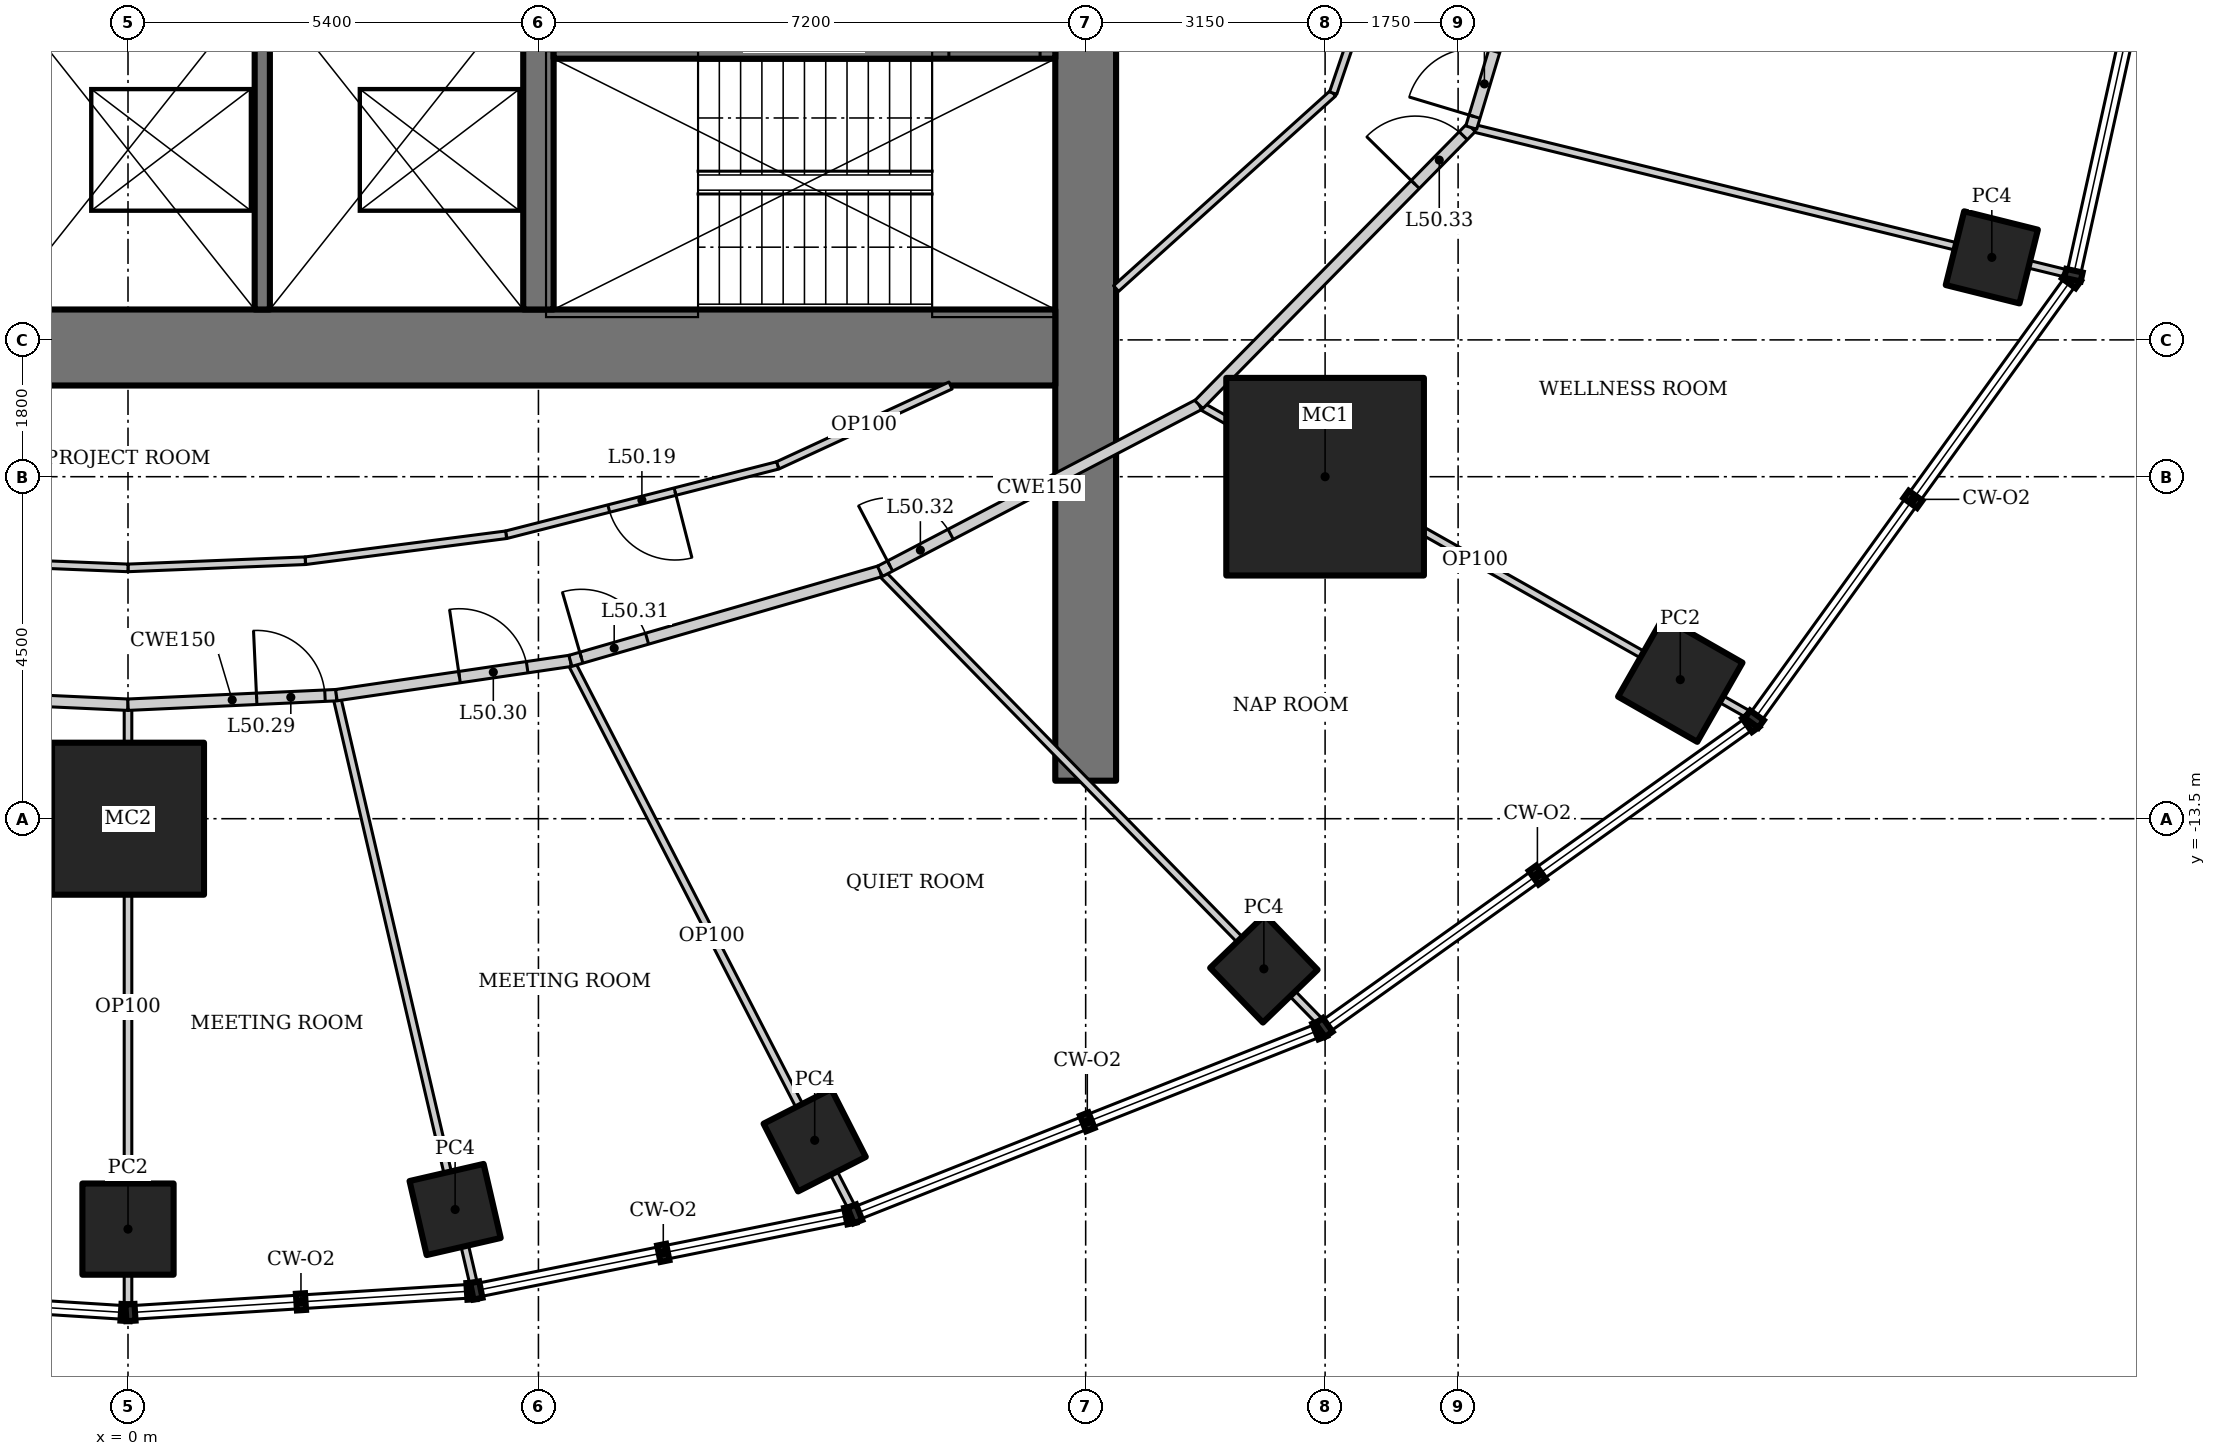
"""IFC4 building model, lengths in metres.
Left out: names, types, materials, properties, quantities, classifications, styles, units other than length and angle.
Written with IfcOpenShell. Run it as: python <this file> out.ifc"""

import sys

from ifc_helpers import new_model, si_unit, direction, frame, frame_2d, origin, origin_2d, place, context, subcontext, project, spatial, rectangle, hollow_rectangle, extrude, element, fill, save


model = new_model("IFC4")
c1 = context("Model", 3, precision=1e-05, world=origin(), true_north=direction((0.0, 1.0)))
c2 = subcontext(c1, "Body", "Model", "MODEL_VIEW")
j1 = project(units=[si_unit("LENGTHUNIT", "METRE"), si_unit("PLANEANGLEUNIT", "RADIAN")], contexts=[c1])
p1 = place(None, origin())
s1 = spatial("IfcSite", under=j1, at=p1, CompositionType="ELEMENT")
p2 = place(p1, origin())
s2 = spatial("IfcBuilding", under=s1, at=p2, CompositionType="ELEMENT")
p3 = place(p2, frame((0.0, 0.0, 215.8)))
s3 = spatial("IfcBuildingStorey", under=s2, at=p3, CompositionType="ELEMENT", Elevation=215.8)
p4 = place(p3, frame((0.0, -13.5, 0.0), z_axis=(0.0, 0.0, 1.0), x_axis=(1.0, 0.0, 0.0)))
e1 = element("IfcColumn", 1, at=p4, inside=s3, PredefinedType="COLUMN", context=c2, shape_type="SweptSolid", body=[
    extrude(hollow_rectangle(XDim=2.0, YDim=2.0, WallThickness=0.17, at=origin_2d()), origin(), (0.0, 0.0, 1.0), 4.2),
])
p5 = place(p3, frame((15.75, -9.0, 0.0), z_axis=(0.0, 0.0, 1.0), x_axis=(1.0, 0.0, 0.0)))
e2 = element("IfcColumn", 2, at=p5, inside=s3, PredefinedType="COLUMN", context=c2, shape_type="SweptSolid", body=[
    extrude(hollow_rectangle(XDim=2.6, YDim=2.6, WallThickness=0.13, at=origin_2d()), origin(), (0.0, 0.0, 1.0), 4.2),
])
p6 = place(p3, frame((0.0, -18.9, 0.0), z_axis=(0.0, 0.0, 1.0), x_axis=(1.0, 0.0, 0.0)))
e3 = element("IfcColumn", 3, at=p6, inside=s3, PredefinedType="COLUMN", context=c2, shape_type="SweptSolid", body=[
    extrude(hollow_rectangle(XDim=1.2, YDim=1.2, WallThickness=0.1, at=origin_2d()), origin(), (0.0, 0.0, 1.0), 4.2),
])
for number, where, z_axis, x_axis in (
    (4, (4.304, -18.642, 0.0), (0.0, 0.0, 1.0), (0.974, 0.225, 0.0)),
    (5, (9.035, -17.731, 0.0), (0.0, 0.0, 1.0), (0.891, 0.454, 0.0)),
    (6, (14.944, -15.475, 0.0), (0.0, 0.0, 1.0), (0.719, 0.695, 0.0)),
):
    element("IfcColumn", number, at=place(p3, frame(where, z_axis=z_axis, x_axis=x_axis)), inside=s3, PredefinedType="COLUMN", context=c2, shape_type="SweptSolid", body=[
        extrude(hollow_rectangle(XDim=1.0, YDim=1.0, WallThickness=0.08, at=origin_2d()), origin(), (0.0, 0.0, 1.0), 4.2),
    ])
p7 = place(p3, frame((20.423, -11.67, 0.0), z_axis=(0.0, 0.0, 1.0), x_axis=(0.496139221777, 0.86824298017, 0.0)))
e7 = element("IfcColumn", 7, at=p7, inside=s3, PredefinedType="COLUMN", context=c2, shape_type="SweptSolid", body=[
    extrude(hollow_rectangle(XDim=1.2, YDim=1.2, WallThickness=0.1, at=origin_2d()), origin(), (0.0, 0.0, 1.0), 4.2),
])
p8 = place(p3, frame((24.522, -6.114, 0.0), z_axis=(0.0, 0.0, 1.0), x_axis=(0.2419218956, 0.970295726276, 0.0)))
e8 = element("IfcColumn", 8, at=p8, inside=s3, PredefinedType="COLUMN", context=c2, shape_type="SweptSolid", body=[
    extrude(hollow_rectangle(XDim=1.0, YDim=1.0, WallThickness=0.08, at=origin_2d()), origin(), (0.0, 0.0, 1.0), 4.2),
])
p9 = place(p3, frame((12.6, -13.0, 0.0), z_axis=(0.0, 0.0, 1.0), x_axis=(0.0, 1.0, 0.0)))
e9 = element("IfcWall", 9, at=p9, inside=s3, PredefinedType="SHEAR", context=c2, shape_type="SweptSolid", body=[
    extrude(rectangle(XDim=26.0, YDim=0.8, at=frame_2d((13.0, 0.0))), origin(), (0.0, 0.0, 1.0), 4.2),
])
p10 = place(p9, frame((12.1, 0.0, 0.0)))
e10 = element("IfcOpeningElement", 10, at=p10, cuts=e9, PredefinedType="OPENING", context=c2, shape_type="SweptSolid", body=[
    extrude(rectangle(XDim=1.8, YDim=2.1, at=frame_2d((0.9, 1.05))), frame((0.0, 0.41, 0.0), z_axis=(0.0, -1.0, 0.0), x_axis=(1.0, 0.0, 0.0)), (0.0, 0.0, 1.0), 0.82),
])
p11 = place(p3, frame((-12.2, -7.3, 0.0), z_axis=(0.0, 0.0, 1.0), x_axis=(1.0, 0.0, 0.0)))
e11 = element("IfcWall", 11, at=p11, inside=s3, PredefinedType="SHEAR", context=c2, shape_type="SweptSolid", body=[
    extrude(rectangle(XDim=24.4, YDim=1.0, at=frame_2d((12.2, 0.0))), origin(), (0.0, 0.0, 1.0), 4.2),
])
p12 = place(p3, frame((5.4, -6.8, 0.0), z_axis=(0.0, 0.0, 1.0), x_axis=(0.0, 1.0, 0.0)))
e12 = element("IfcWall", 12, at=p12, inside=s3, PredefinedType="SHEAR", context=c2, shape_type="SweptSolid", body=[
    extrude(rectangle(XDim=14.6, YDim=0.4, at=frame_2d((7.3, 0.0))), origin(), (0.0, 0.0, 1.0), 4.2),
])
p13 = place(p12, frame((5.9, 0.0, 0.0)))
e13 = element("IfcOpeningElement", 13, at=p13, cuts=e12, PredefinedType="OPENING", context=c2, shape_type="SweptSolid", body=[
    extrude(rectangle(XDim=1.8, YDim=2.1, at=frame_2d((0.9, 1.05))), frame((0.0, 0.21, 0.0), z_axis=(0.0, -1.0, 0.0), x_axis=(1.0, 0.0, 0.0)), (0.0, 0.0, 1.0), 0.42),
])
p14 = place(p3, frame((1.767, -2.6, 0.0), z_axis=(0.0, 0.0, 1.0), x_axis=(0.0, -1.0, 0.0)))
e14 = element("IfcWall", 14, at=p14, inside=s3, PredefinedType="SOLIDWALL", context=c2, shape_type="SweptSolid", body=[
    extrude(rectangle(XDim=4.2, YDim=0.2, at=frame_2d((2.1, 0.0))), origin(), (0.0, 0.0, 1.0), 4.2),
])
p15 = place(p3, frame((5.6, -3.4, 0.0), z_axis=(0.0, 0.0, 1.0), x_axis=(1.0, 0.0, 0.0)))
e15 = element("IfcWall", 15, at=p15, inside=s3, PredefinedType="SHEAR", context=c2, shape_type="SweptSolid", body=[
    extrude(rectangle(XDim=6.6, YDim=0.2, at=frame_2d((3.3, 0.0))), origin(), (0.0, 0.0, 1.0), 4.2),
])
p16 = place(p15, frame((5.2, 0.0, 0.0)))
e16 = element("IfcOpeningElement", 16, at=p16, cuts=e15, PredefinedType="OPENING", context=c2, shape_type="SweptSolid", body=[
    extrude(rectangle(XDim=1.2, YDim=2.1, at=frame_2d((0.6, 1.05))), frame((0.0, 0.11, 0.0), z_axis=(0.0, -1.0, 0.0), x_axis=(1.0, 0.0, 0.0)), (0.0, 0.0, 1.0), 0.22),
])
p17 = place(p3, frame((0.0, -19.945, 0.0), z_axis=(0.0, 0.0, 1.0), x_axis=(0.0, 1.0, 0.0)))
e17 = element("IfcWall", 17, at=p17, inside=s3, PredefinedType="PARTITIONING", context=c2, shape_type="SweptSolid", body=[
    extrude(rectangle(XDim=7.945, YDim=0.1, at=frame_2d((3.972, 0.0))), origin(), (0.0, 0.0, 1.0), 3.644),
])
p18 = place(p3, frame((4.556, -19.657, 0.0), z_axis=(0.0, 0.0, 1.0), x_axis=(-0.227034513848, 0.973886712879, 0.0)))
e18 = element("IfcWall", 18, at=p18, inside=s3, PredefinedType="PARTITIONING", context=c2, shape_type="SweptSolid", body=[
    extrude(rectangle(XDim=7.991, YDim=0.1, at=frame_2d((3.996, 0.0))), origin(), (0.0, 0.0, 1.0), 3.293),
])
p19 = place(p3, frame((9.539, -18.65, 0.0), z_axis=(0.0, 0.0, 1.0), x_axis=(-0.457552286462, 0.88918271753, 0.0)))
e19 = element("IfcWall", 19, at=p19, inside=s3, PredefinedType="PARTITIONING", context=c2, shape_type="SweptSolid", body=[
    extrude(rectangle(XDim=8.128, YDim=0.1, at=frame_2d((4.064, 0.0))), origin(), (0.0, 0.0, 1.0), 3.293),
])
p20 = place(p3, frame((15.709, -16.199, 0.0), z_axis=(0.0, 0.0, 1.0), x_axis=(-0.69875697861, 0.715359129978, 0.0)))
e20 = element("IfcWall", 20, at=p20, inside=s3, PredefinedType="PARTITIONING", context=c2, shape_type="SweptSolid", body=[
    extrude(rectangle(XDim=8.323, YDim=0.1, at=frame_2d((4.162, 0.0))), origin(), (0.0, 0.0, 1.0), 3.41),
])
p21 = place(p3, frame((21.358, -12.15, 0.0), z_axis=(0.0, 0.0, 1.0), x_axis=(-0.871080529249, 0.491140215786, 0.0)))
e21 = element("IfcWall", 21, at=p21, inside=s3, PredefinedType="PARTITIONING", context=c2, shape_type="SweptSolid", body=[
    extrude(rectangle(XDim=8.345, YDim=0.1, at=frame_2d((4.173, 0.0))), origin(), (0.0, 0.0, 1.0), 3.522),
])
p22 = place(p3, frame((25.543, -6.336, 0.0), z_axis=(0.0, 0.0, 1.0), x_axis=(-0.97123661777, 0.238116425942, 0.0)))
e22 = element("IfcWall", 22, at=p22, inside=s3, PredefinedType="PARTITIONING", context=c2, shape_type="SweptSolid", body=[
    extrude(rectangle(XDim=8.103, YDim=0.1, at=frame_2d((4.052, 0.0))), origin(), (0.0, 0.0, 1.0), 3.108),
])
p23 = place(p3, frame((-2.741, -11.875, 0.0), z_axis=(0.0, 0.0, 1.0), x_axis=(0.998953998629, -0.045726454297, 0.0)))
e23 = element("IfcWall", 23, at=p23, inside=s3, PredefinedType="PARTITIONING", context=c2, shape_type="SweptSolid", body=[
    extrude(rectangle(XDim=2.744, YDim=0.15, at=frame_2d((1.372, 0.0))), origin(), (0.0, 0.0, 1.0), 4.05),
])
p24 = place(p3, frame((0.0, -12.0, 0.0), z_axis=(0.0, 0.0, 1.0), x_axis=(0.998953998629, 0.045726454297, 0.0)))
e24 = element("IfcWall", 24, at=p24, inside=s3, PredefinedType="PARTITIONING", context=c2, shape_type="SweptSolid", body=[
    extrude(rectangle(XDim=2.744, YDim=0.15, at=frame_2d((1.372, 0.0))), origin(), (0.0, 0.0, 1.0), 4.05),
])
p25 = place(p24, frame((1.694, 0.0, 0.0)))
e25 = element("IfcOpeningElement", 25, at=p25, cuts=e24, PredefinedType="OPENING", context=c2, shape_type="SweptSolid", body=[
    extrude(rectangle(XDim=0.9, YDim=2.1, at=frame_2d((0.45, 1.05))), frame((0.0, 0.085, 0.0), z_axis=(0.0, -1.0, 0.0), x_axis=(1.0, 0.0, 0.0)), (0.0, 0.0, 1.0), 0.17),
])
p26 = place(p3, frame((2.741, -11.875, 0.0), z_axis=(0.0, 0.0, 1.0), x_axis=(0.989421822189, 0.145067080265, 0.0)))
e26 = element("IfcWall", 26, at=p26, inside=s3, PredefinedType="PARTITIONING", context=c2, shape_type="SweptSolid", body=[
    extrude(rectangle(XDim=3.112, YDim=0.15, at=frame_2d((1.556, 0.0))), origin(), (0.0, 0.0, 1.0), 4.05),
])
p27 = place(p26, frame((1.637, 0.0, 0.0)))
e27 = element("IfcOpeningElement", 27, at=p27, cuts=e26, PredefinedType="OPENING", context=c2, shape_type="SweptSolid", body=[
    extrude(rectangle(XDim=0.9, YDim=2.1, at=frame_2d((0.45, 1.05))), frame((0.0, 0.085, 0.0), z_axis=(0.0, -1.0, 0.0), x_axis=(1.0, 0.0, 0.0)), (0.0, 0.0, 1.0), 0.17),
])
p28 = place(p3, frame((5.82, -11.423, 0.0), z_axis=(0.0, 0.0, 1.0), x_axis=(0.960614838378, 0.27788330696, 0.0)))
e28 = element("IfcWall", 28, at=p28, inside=s3, PredefinedType="PARTITIONING", context=c2, shape_type="SweptSolid", body=[
    extrude(rectangle(XDim=4.24, YDim=0.15, at=frame_2d((2.12, 0.0))), origin(), (0.0, 0.0, 1.0), 4.05),
])
p29 = place(p28, frame((0.15, 0.0, 0.0)))
e29 = element("IfcOpeningElement", 29, at=p29, cuts=e28, PredefinedType="OPENING", context=c2, shape_type="SweptSolid", body=[
    extrude(rectangle(XDim=0.9, YDim=2.1, at=frame_2d((0.45, 1.05))), frame((0.0, 0.085, 0.0), z_axis=(0.0, -1.0, 0.0), x_axis=(1.0, 0.0, 0.0)), (0.0, 0.0, 1.0), 0.17),
])
p30 = place(p3, frame((9.893, -10.245, 0.0), z_axis=(0.0, 0.0, 1.0), x_axis=(0.886174439647, 0.463351769735, 0.0)))
e30 = element("IfcWall", 30, at=p30, inside=s3, PredefinedType="PARTITIONING", context=c2, shape_type="SweptSolid", body=[
    extrude(rectangle(XDim=4.735, YDim=0.15, at=frame_2d((2.367, 0.0))), origin(), (0.0, 0.0, 1.0), 4.05),
])
p31 = place(p30, frame((0.15, 0.0, 0.0)))
e31 = element("IfcOpeningElement", 31, at=p31, cuts=e30, PredefinedType="OPENING", context=c2, shape_type="SweptSolid", body=[
    extrude(rectangle(XDim=0.9, YDim=2.1, at=frame_2d((0.45, 1.05))), frame((0.0, 0.085, 0.0), z_axis=(0.0, -1.0, 0.0), x_axis=(1.0, 0.0, 0.0)), (0.0, 0.0, 1.0), 0.17),
])
p32 = place(p3, frame((14.089, -8.051, 0.0), z_axis=(0.0, 0.0, 1.0), x_axis=(0.701111216625, 0.713051934941, 0.0)))
e32 = element("IfcWall", 32, at=p32, inside=s3, PredefinedType="PARTITIONING", context=c2, shape_type="SweptSolid", body=[
    extrude(rectangle(XDim=5.112, YDim=0.15, at=frame_2d((2.556, 0.0))), origin(), (0.0, 0.0, 1.0), 4.05),
])
p33 = place(p32, frame((4.061, 0.0, 0.0)))
e33 = element("IfcOpeningElement", 33, at=p33, cuts=e32, PredefinedType="OPENING", context=c2, shape_type="SweptSolid", body=[
    extrude(rectangle(XDim=0.9, YDim=2.1, at=frame_2d((0.45, 1.05))), frame((0.0, 0.085, 0.0), z_axis=(0.0, -1.0, 0.0), x_axis=(1.0, 0.0, 0.0)), (0.0, 0.0, 1.0), 0.17),
])
p34 = place(p3, frame((10.823, -7.8, 0.0), z_axis=(0.0, 0.0, 1.0), x_axis=(-0.907759689292, -0.419490579748, 0.0)))
e34 = element("IfcWall", 34, at=p34, inside=s3, PredefinedType="PARTITIONING", context=c2, shape_type="SweptSolid", body=[
    extrude(rectangle(XDim=2.506, YDim=0.1, at=frame_2d((1.253, 0.0))), origin(), (0.0, 0.0, 1.0), 4.05),
])
p35 = place(p3, frame((8.548, -8.851, 0.0), z_axis=(0.0, 0.0, 1.0), x_axis=(-0.968887312542, -0.247502273921, 0.0)))
e35 = element("IfcWall", 35, at=p35, inside=s3, PredefinedType="PARTITIONING", context=c2, shape_type="SweptSolid", body=[
    extrude(rectangle(XDim=3.687, YDim=0.1, at=frame_2d((1.844, 0.0))), origin(), (0.0, 0.0, 1.0), 4.05),
])
p36 = place(p35, frame((1.394, 0.0, 0.0)))
e36 = element("IfcOpeningElement", 36, at=p36, cuts=e35, PredefinedType="OPENING", context=c2, shape_type="SweptSolid", body=[
    extrude(rectangle(XDim=0.9, YDim=2.1, at=frame_2d((0.45, 1.05))), frame((0.0, 0.06, 0.0), z_axis=(0.0, -1.0, 0.0), x_axis=(1.0, 0.0, 0.0)), (0.0, 0.0, 1.0), 0.12),
])
p37 = place(p3, frame((4.975, -9.764, 0.0), z_axis=(0.0, 0.0, 1.0), x_axis=(-0.99173579163, -0.128296997624, 0.0)))
e37 = element("IfcWall", 37, at=p37, inside=s3, PredefinedType="PARTITIONING", context=c2, shape_type="SweptSolid", body=[
    extrude(rectangle(XDim=2.664, YDim=0.1, at=frame_2d((1.332, 0.0))), origin(), (0.0, 0.0, 1.0), 4.05),
])
for number, where, z_axis, x_axis in (
    (38, (2.333, -10.106, 0.0), (0.0, 0.0, 1.0), (-0.999, -0.04, 0.0)),
    (39, (0.0, -10.2, 0.0), (0.0, 0.0, 1.0), (-0.999, 0.04, 0.0)),
):
    element("IfcWall", number, at=place(p3, frame(where, z_axis=z_axis, x_axis=x_axis)), inside=s3, PredefinedType="PARTITIONING", context=c2, shape_type="SweptSolid", body=[
        extrude(rectangle(XDim=2.335, YDim=0.1, at=frame_2d((1.167, 0.0))), origin(), (0.0, 0.0, 1.0), 4.05),
    ])
p38 = place(p3, frame((15.856, -3.953, 0.0), z_axis=(0.0, 0.0, 1.0), x_axis=(-0.743177243228, -0.669094601046, 0.0)))
e40 = element("IfcWall", 40, at=p38, inside=s3, PredefinedType="PARTITIONING", context=c2, shape_type="SweptSolid", body=[
    extrude(rectangle(XDim=3.843, YDim=0.1, at=frame_2d((1.921, 0.0))), origin(), (0.0, 0.0, 1.0), 4.05),
])
p39 = place(p3, frame((17.673, -4.406, 0.0), z_axis=(0.0, 0.0, 1.0), x_axis=(0.288362447016, 0.957521330912, 0.0)))
e41 = element("IfcWall", 41, at=p39, inside=s3, PredefinedType="PARTITIONING", context=c2, shape_type="SweptSolid", body=[
    extrude(rectangle(XDim=2.163, YDim=0.15, at=frame_2d((1.082, 0.0))), origin(), (0.0, 0.0, 1.0), 4.05),
])
p40 = place(p39, frame((0.15, 0.0, 0.0)))
e42 = element("IfcOpeningElement", 42, at=p40, cuts=e41, PredefinedType="OPENING", context=c2, shape_type="SweptSolid", body=[
    extrude(rectangle(XDim=0.9, YDim=2.1, at=frame_2d((0.45, 1.05))), frame((0.0, 0.085, 0.0), z_axis=(0.0, -1.0, 0.0), x_axis=(1.0, 0.0, 0.0)), (0.0, 0.0, 1.0), 0.17),
])
p41 = place(p3, frame((16.249, -2.796, 0.0), z_axis=(0.0, 0.0, 1.0), x_axis=(-0.321913473529, -0.946769093053, 0.0)))
e43 = element("IfcWall", 43, at=p41, inside=s3, PredefinedType="PARTITIONING", context=c2, shape_type="SweptSolid", body=[
    extrude(rectangle(XDim=1.223, YDim=0.1, at=frame_2d((0.611, 0.0))), origin(), (0.0, 0.0, 1.0), 4.05),
])
p42 = place(p16, origin())
e44 = element("IfcDoor", 44, at=p42, inside=s3, OperationType="SINGLE_SWING_RIGHT", PredefinedType="DOOR", context=c2, shape_type="SweptSolid", body=[
    extrude(rectangle(XDim=1.2, YDim=2.1, at=frame_2d((0.6, 1.05))), frame((0.0, 0.025, 0.0), z_axis=(0.0, -1.0, 0.0), x_axis=(1.0, 0.0, 0.0)), (0.0, 0.0, 1.0), 0.05),
])
fill(e16, e44)
p43 = place(p36, origin())
e45 = element("IfcDoor", 45, at=p43, inside=s3, OperationType="SINGLE_SWING_LEFT", PredefinedType="DOOR", context=c2, shape_type="SweptSolid", body=[
    extrude(rectangle(XDim=0.9, YDim=2.1, at=frame_2d((0.45, 1.05))), frame((0.0, 0.025, 0.0), z_axis=(0.0, -1.0, 0.0), x_axis=(1.0, 0.0, 0.0)), (0.0, 0.0, 1.0), 0.05),
])
fill(e36, e45)
p44 = place(p25, origin())
e46 = element("IfcDoor", 46, at=p44, inside=s3, OperationType="SINGLE_SWING_LEFT", PredefinedType="DOOR", context=c2, shape_type="SweptSolid", body=[
    extrude(rectangle(XDim=0.9, YDim=2.1, at=frame_2d((0.45, 1.05))), frame((0.0, 0.025, 0.0), z_axis=(0.0, -1.0, 0.0), x_axis=(1.0, 0.0, 0.0)), (0.0, 0.0, 1.0), 0.05),
])
fill(e25, e46)
p45 = place(p27, origin())
e47 = element("IfcDoor", 47, at=p45, inside=s3, OperationType="SINGLE_SWING_LEFT", PredefinedType="DOOR", context=c2, shape_type="SweptSolid", body=[
    extrude(rectangle(XDim=0.9, YDim=2.1, at=frame_2d((0.45, 1.05))), frame((0.0, 0.025, 0.0), z_axis=(0.0, -1.0, 0.0), x_axis=(1.0, 0.0, 0.0)), (0.0, 0.0, 1.0), 0.05),
])
fill(e27, e47)
p46 = place(p29, origin())
e48 = element("IfcDoor", 48, at=p46, inside=s3, OperationType="SINGLE_SWING_LEFT", PredefinedType="DOOR", context=c2, shape_type="SweptSolid", body=[
    extrude(rectangle(XDim=0.9, YDim=2.1, at=frame_2d((0.45, 1.05))), frame((0.0, 0.025, 0.0), z_axis=(0.0, -1.0, 0.0), x_axis=(1.0, 0.0, 0.0)), (0.0, 0.0, 1.0), 0.05),
])
fill(e29, e48)
p47 = place(p31, origin())
e49 = element("IfcDoor", 49, at=p47, inside=s3, OperationType="SINGLE_SWING_LEFT", PredefinedType="DOOR", context=c2, shape_type="SweptSolid", body=[
    extrude(rectangle(XDim=0.9, YDim=2.1, at=frame_2d((0.45, 1.05))), frame((0.0, 0.025, 0.0), z_axis=(0.0, -1.0, 0.0), x_axis=(1.0, 0.0, 0.0)), (0.0, 0.0, 1.0), 0.05),
])
fill(e31, e49)
p48 = place(p33, origin())
e50 = element("IfcDoor", 50, at=p48, inside=s3, OperationType="SINGLE_SWING_LEFT", PredefinedType="DOOR", context=c2, shape_type="SweptSolid", body=[
    extrude(rectangle(XDim=0.9, YDim=2.1, at=frame_2d((0.45, 1.05))), frame((0.0, 0.025, 0.0), z_axis=(0.0, -1.0, 0.0), x_axis=(1.0, 0.0, 0.0)), (0.0, 0.0, 1.0), 0.05),
])
fill(e33, e50)
p49 = place(p40, origin())
e51 = element("IfcDoor", 51, at=p49, inside=s3, OperationType="SINGLE_SWING_LEFT", PredefinedType="DOOR", context=c2, shape_type="SweptSolid", body=[
    extrude(rectangle(XDim=0.9, YDim=2.1, at=frame_2d((0.45, 1.05))), frame((0.0, 0.025, 0.0), z_axis=(0.0, -1.0, 0.0), x_axis=(1.0, 0.0, 0.0)), (0.0, 0.0, 1.0), 0.05),
])
fill(e42, e51)
save(model, sys.argv[1])
